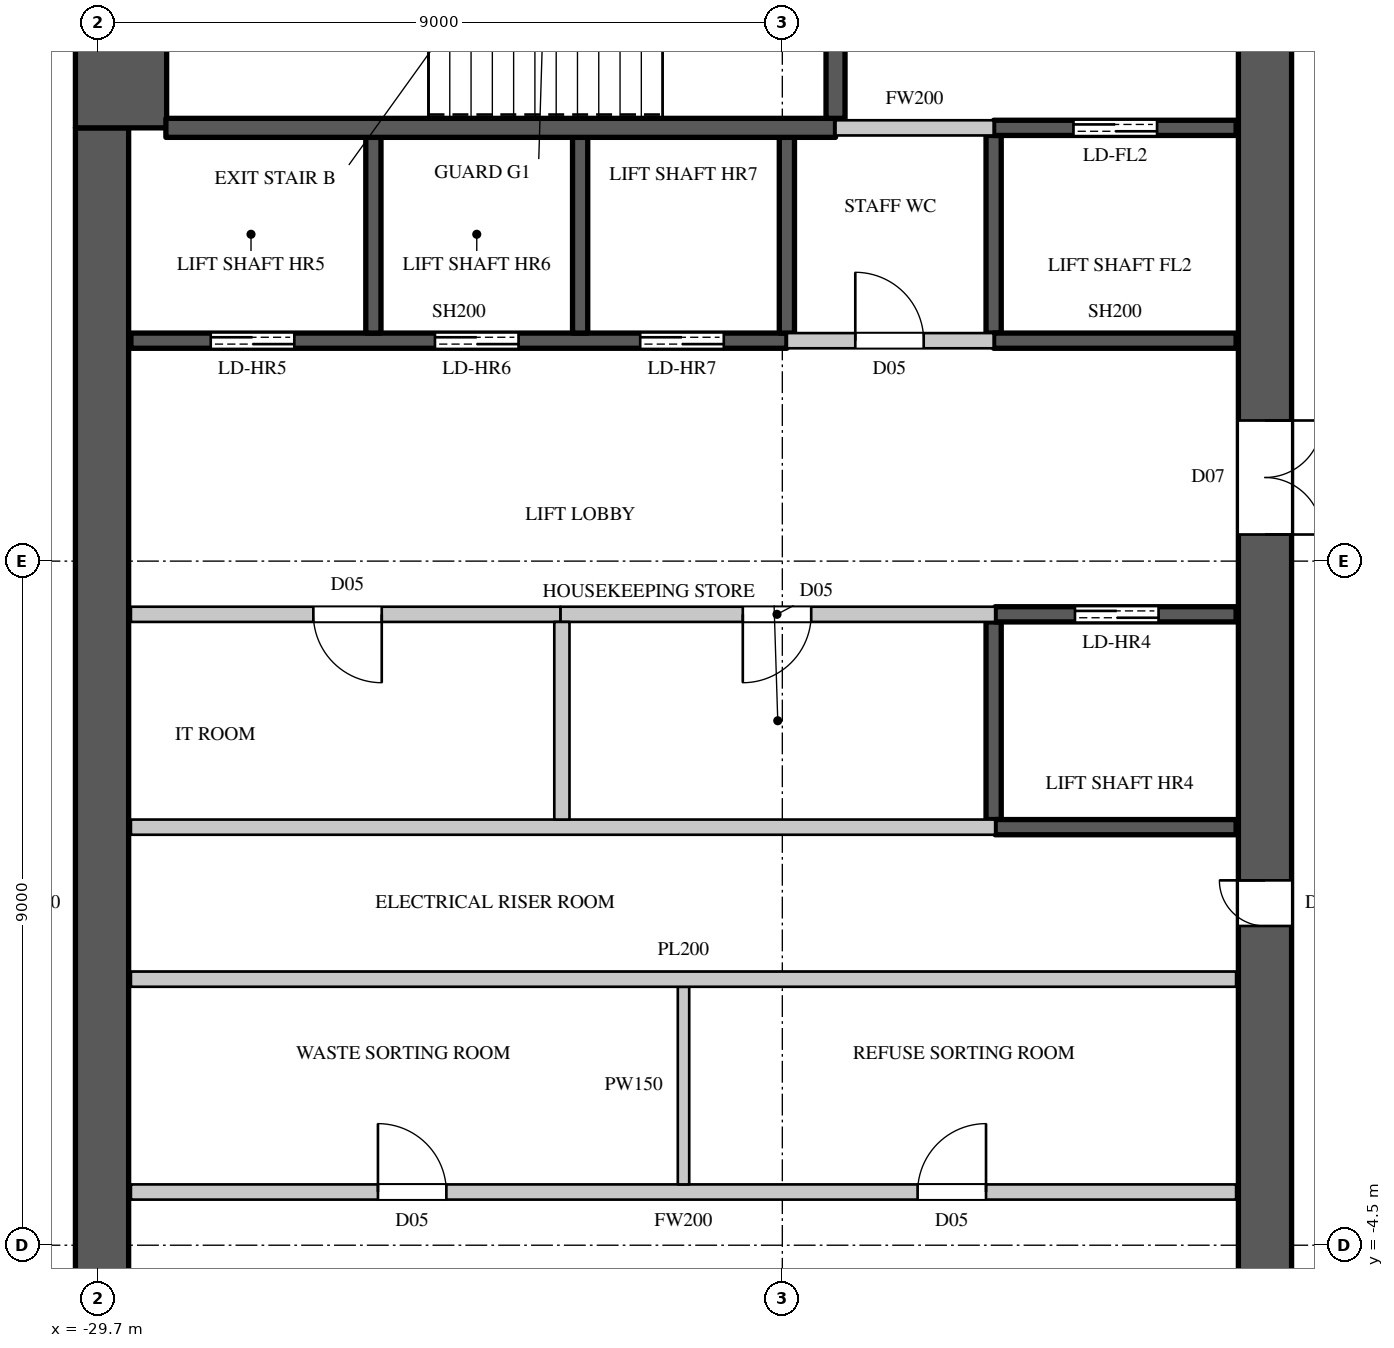
"""IFC4 building model, lengths in metres.
Left out: names, types, materials, properties, quantities, classifications, styles, units other than length and angle.
Written with IfcOpenShell. Run it as: python <this file> out.ifc"""

import sys

from ifc_helpers import new_model, si_unit, direction, frame, frame_2d, origin, place, context, subcontext, project, spatial, rectangle, extrude, element, fill, save


model = new_model("IFC4")
c1 = context("Model", 3, precision=1e-05, world=origin(), true_north=direction((0.0, 1.0)))
c2 = subcontext(c1, "Body", "Model", "MODEL_VIEW")
j1 = project(units=[si_unit("LENGTHUNIT", "METRE"), si_unit("PLANEANGLEUNIT", "RADIAN")], contexts=[c1])
p1 = place(None, origin())
s1 = spatial("IfcSite", under=j1, at=p1, CompositionType="ELEMENT")
p2 = place(p1, origin())
s2 = spatial("IfcBuilding", under=s1, at=p2, CompositionType="ELEMENT")
p3 = place(p2, frame((0.0, 0.0, 296.7)))
s3 = spatial("IfcBuildingStorey", under=s2, at=p3, CompositionType="ELEMENT", Elevation=296.7)
p4 = place(p3, frame((-14.35, -14.8, 0.0), z_axis=(0.0, 0.0, 1.0), x_axis=(0.0, 1.0, 0.0)))
e1 = element("IfcWall", 1, at=p4, inside=s3, PredefinedType="SHEAR", context=c2, shape_type="SweptSolid", body=[
    extrude(rectangle(XDim=29.6, YDim=0.7, at=frame_2d((14.8, 0.0))), origin(), (0.0, 0.0, 1.0), 4.1),
])
p5 = place(p4, frame((1.55, 0.0, 0.0)))
e2 = element("IfcOpeningElement", 2, at=p5, cuts=e1, PredefinedType="OPENING", context=c2, shape_type="SweptSolid", body=[
    extrude(rectangle(XDim=1.5, YDim=2.4, at=frame_2d((0.75, 1.2))), frame((0.0, 0.36, 0.0), z_axis=(0.0, -1.0, 0.0), x_axis=(1.0, 0.0, 0.0)), (0.0, 0.0, 1.0), 0.72),
])
p6 = place(p4, frame((26.55, 0.0, 0.0)))
e3 = element("IfcOpeningElement", 3, at=p6, cuts=e1, PredefinedType="OPENING", context=c2, shape_type="SweptSolid", body=[
    extrude(rectangle(XDim=1.5, YDim=2.4, at=frame_2d((0.75, 1.2))), frame((0.0, 0.36, 0.0), z_axis=(0.0, -1.0, 0.0), x_axis=(1.0, 0.0, 0.0)), (0.0, 0.0, 1.0), 0.72),
])
p7 = place(p4, frame((8.45, 0.0, 0.0)))
e4 = element("IfcOpeningElement", 4, at=p7, cuts=e1, PredefinedType="OPENING", context=c2, shape_type="SweptSolid", body=[
    extrude(rectangle(XDim=1.5, YDim=2.4, at=frame_2d((0.75, 1.2))), frame((0.0, 0.36, 0.0), z_axis=(0.0, -1.0, 0.0), x_axis=(1.0, 0.0, 0.0)), (0.0, 0.0, 1.0), 0.72),
])
p8 = place(p4, frame((19.65, 0.0, 0.0)))
e5 = element("IfcOpeningElement", 5, at=p8, cuts=e1, PredefinedType="OPENING", context=c2, shape_type="SweptSolid", body=[
    extrude(rectangle(XDim=1.5, YDim=2.4, at=frame_2d((0.75, 1.2))), frame((0.0, 0.36, 0.0), z_axis=(0.0, -1.0, 0.0), x_axis=(1.0, 0.0, 0.0)), (0.0, 0.0, 1.0), 0.72),
])
p9 = place(p4, frame((14.5, 0.0, 0.0)))
e6 = element("IfcOpeningElement", 6, at=p9, cuts=e1, PredefinedType="OPENING", context=c2, shape_type="SweptSolid", body=[
    extrude(rectangle(XDim=0.6, YDim=2.0, at=frame_2d((0.3, 1.0))), frame((0.0, 0.36, 0.0), z_axis=(0.0, -1.0, 0.0), x_axis=(1.0, 0.0, 0.0)), (0.0, 0.0, 1.0), 0.72),
])
p10 = place(p3, frame((-29.65, -10.2, 0.0), z_axis=(0.0, 0.0, 1.0), x_axis=(0.0, 1.0, 0.0)))
e7 = element("IfcWall", 7, at=p10, inside=s3, PredefinedType="SHEAR", context=c2, shape_type="SweptSolid", body=[
    extrude(rectangle(XDim=20.4, YDim=0.7, at=frame_2d((10.2, 0.0))), origin(), (0.0, 0.0, 1.0), 4.1),
])
p11 = place(p3, frame((-29.4, 10.2, 0.0), z_axis=(0.0, 0.0, 1.0), x_axis=(0.0, 1.0, 0.0)))
e8 = element("IfcWall", 8, at=p11, inside=s3, PredefinedType="SHEAR", context=c2, shape_type="SweptSolid", body=[
    extrude(rectangle(XDim=4.6, YDim=1.2, at=frame_2d((2.3, 0.0))), origin(), (0.0, 0.0, 1.0), 4.1),
])
p12 = place(p3, frame((-29.27, -3.8, 0.0), z_axis=(0.0, 0.0, 1.0), x_axis=(1.0, 0.0, 0.0)))
e9 = element("IfcWall", 9, at=p12, inside=s3, PredefinedType="PARTITIONING", context=c2, shape_type="SweptSolid", body=[
    extrude(rectangle(XDim=14.54, YDim=0.2, at=frame_2d((7.27, 0.0))), origin(), (0.0, 0.0, 1.0), 3.8),
])
p13 = place(p12, frame((3.25, 0.0, 0.0)))
e10 = element("IfcOpeningElement", 10, at=p13, cuts=e9, PredefinedType="OPENING", context=c2, shape_type="SweptSolid", body=[
    extrude(rectangle(XDim=0.9, YDim=2.2, at=frame_2d((0.45, 1.1))), frame((0.0, 0.11, 0.0), z_axis=(0.0, -1.0, 0.0), x_axis=(1.0, 0.0, 0.0)), (0.0, 0.0, 1.0), 0.22),
])
p14 = place(p12, frame((10.35, 0.0, 0.0)))
e11 = element("IfcOpeningElement", 11, at=p14, cuts=e9, PredefinedType="OPENING", context=c2, shape_type="SweptSolid", body=[
    extrude(rectangle(XDim=0.9, YDim=2.2, at=frame_2d((0.45, 1.1))), frame((0.0, 0.11, 0.0), z_axis=(0.0, -1.0, 0.0), x_axis=(1.0, 0.0, 0.0)), (0.0, 0.0, 1.0), 0.22),
])
p15 = place(p3, frame((-23.62, 3.8, 0.0), z_axis=(0.0, 0.0, 1.0), x_axis=(1.0, 0.0, 0.0)))
e12 = element("IfcWall", 12, at=p15, inside=s3, PredefinedType="PARTITIONING", context=c2, shape_type="SweptSolid", body=[
    extrude(rectangle(XDim=5.72, YDim=0.2, at=frame_2d((2.86, 0.0))), origin(), (0.0, 0.0, 1.0), 3.8),
])
p16 = place(p15, frame((2.4, 0.0, 0.0)))
e13 = element("IfcOpeningElement", 13, at=p16, cuts=e12, PredefinedType="OPENING", context=c2, shape_type="SweptSolid", body=[
    extrude(rectangle(XDim=0.9, YDim=2.2, at=frame_2d((0.45, 1.1))), frame((0.0, 0.11, 0.0), z_axis=(0.0, -1.0, 0.0), x_axis=(1.0, 0.0, 0.0)), (0.0, 0.0, 1.0), 0.22),
])
p17 = place(p3, frame((-20.64, 7.4, 0.0), z_axis=(0.0, 0.0, 1.0), x_axis=(1.0, 0.0, 0.0)))
e14 = element("IfcWall", 14, at=p17, inside=s3, PredefinedType="PARTITIONING", context=c2, shape_type="SweptSolid", body=[
    extrude(rectangle(XDim=2.72, YDim=0.2, at=frame_2d((1.36, 0.0))), origin(), (0.0, 0.0, 1.0), 3.8),
])
p18 = place(p17, frame((0.9, 0.0, 0.0)))
e15 = element("IfcOpeningElement", 15, at=p18, cuts=e14, PredefinedType="OPENING", context=c2, shape_type="SweptSolid", body=[
    extrude(rectangle(XDim=0.9, YDim=2.2, at=frame_2d((0.45, 1.1))), frame((0.0, 0.11, 0.0), z_axis=(0.0, -1.0, 0.0), x_axis=(1.0, 0.0, 0.0)), (0.0, 0.0, 1.0), 0.22),
])
p19 = place(p3, frame((-20.0, 10.2, 0.0), z_axis=(0.0, 0.0, 1.0), x_axis=(1.0, 0.0, 0.0)))
e16 = element("IfcWall", 16, at=p19, inside=s3, PredefinedType="PARTITIONING", context=c2, shape_type="SweptSolid", body=[
    extrude(rectangle(XDim=2.08, YDim=0.2, at=frame_2d((1.04, 0.0))), origin(), (0.0, 0.0, 1.0), 3.8),
])
p20 = place(p3, frame((-22.0, -3.7, 0.0), z_axis=(0.0, 0.0, 1.0), x_axis=(0.0, 1.0, 0.0)))
e17 = element("IfcWall", 17, at=p20, inside=s3, PredefinedType="PARTITIONING", context=c2, shape_type="SweptSolid", body=[
    extrude(rectangle(XDim=2.6, YDim=0.15, at=frame_2d((1.3, 0.0))), origin(), (0.0, 0.0, 1.0), 3.8),
])
p21 = place(p3, frame((-29.27, -1.0, 0.0), z_axis=(0.0, 0.0, 1.0), x_axis=(1.0, 0.0, 0.0)))
e18 = element("IfcWall", 18, at=p21, inside=s3, PredefinedType="PARTITIONING", context=c2, shape_type="SweptSolid", body=[
    extrude(rectangle(XDim=14.54, YDim=0.2, at=frame_2d((7.27, 0.0))), origin(), (0.0, 0.0, 1.0), 3.8),
])
p22 = place(p3, frame((-29.27, 1.0, 0.0), z_axis=(0.0, 0.0, 1.0), x_axis=(1.0, 0.0, 0.0)))
e19 = element("IfcWall", 19, at=p22, inside=s3, PredefinedType="PARTITIONING", context=c2, shape_type="SweptSolid", body=[
    extrude(rectangle(XDim=11.37, YDim=0.2, at=frame_2d((5.685, 0.0))), origin(), (0.0, 0.0, 1.0), 3.8),
])
p23 = place(p3, frame((-29.27, 3.8, 0.0), z_axis=(0.0, 0.0, 1.0), x_axis=(1.0, 0.0, 0.0)))
e20 = element("IfcWall", 20, at=p23, inside=s3, PredefinedType="PARTITIONING", context=c2, shape_type="SweptSolid", body=[
    extrude(rectangle(XDim=5.65, YDim=0.2, at=frame_2d((2.825, 0.0))), origin(), (0.0, 0.0, 1.0), 3.8),
])
p24 = place(p23, frame((2.4, 0.0, 0.0)))
e21 = element("IfcOpeningElement", 21, at=p24, cuts=e20, PredefinedType="OPENING", context=c2, shape_type="SweptSolid", body=[
    extrude(rectangle(XDim=0.9, YDim=2.2, at=frame_2d((0.45, 1.1))), frame((0.0, 0.11, 0.0), z_axis=(0.0, -1.0, 0.0), x_axis=(1.0, 0.0, 0.0)), (0.0, 0.0, 1.0), 0.22),
])
p25 = place(p3, frame((-23.6, 1.1, 0.0), z_axis=(0.0, 0.0, 1.0), x_axis=(0.0, 1.0, 0.0)))
e22 = element("IfcWall", 22, at=p25, inside=s3, PredefinedType="PARTITIONING", context=c2, shape_type="SweptSolid", body=[
    extrude(rectangle(XDim=2.6, YDim=0.2, at=frame_2d((1.3, 0.0))), origin(), (0.0, 0.0, 1.0), 3.8),
])
p26 = place(p3, frame((-29.27, 7.4, 0.0), z_axis=(0.0, 0.0, 1.0), x_axis=(1.0, 0.0, 0.0)))
e23 = element("IfcWall", 23, at=p26, inside=s3, PredefinedType="SHEAR", context=c2, shape_type="SweptSolid", body=[
    extrude(rectangle(XDim=8.63, YDim=0.2, at=frame_2d((4.315, 0.0))), origin(), (0.0, 0.0, 1.0), 3.8),
])
p27 = place(p26, frame((1.05, 0.0, 0.0)))
e24 = element("IfcOpeningElement", 24, at=p27, cuts=e23, PredefinedType="OPENING", context=c2, shape_type="SweptSolid", body=[
    extrude(rectangle(XDim=1.1, YDim=2.2, at=frame_2d((0.55, 1.1))), frame((0.0, 0.11, 0.0), z_axis=(0.0, -1.0, 0.0), x_axis=(1.0, 0.0, 0.0)), (0.0, 0.0, 1.0), 0.22),
])
p28 = place(p26, frame((4.0, 0.0, 0.0)))
e25 = element("IfcOpeningElement", 25, at=p28, cuts=e23, PredefinedType="OPENING", context=c2, shape_type="SweptSolid", body=[
    extrude(rectangle(XDim=1.1, YDim=2.2, at=frame_2d((0.55, 1.1))), frame((0.0, 0.11, 0.0), z_axis=(0.0, -1.0, 0.0), x_axis=(1.0, 0.0, 0.0)), (0.0, 0.0, 1.0), 0.22),
])
p29 = place(p26, frame((6.7, 0.0, 0.0)))
e26 = element("IfcOpeningElement", 26, at=p29, cuts=e23, PredefinedType="OPENING", context=c2, shape_type="SweptSolid", body=[
    extrude(rectangle(XDim=1.1, YDim=2.2, at=frame_2d((0.55, 1.1))), frame((0.0, 0.11, 0.0), z_axis=(0.0, -1.0, 0.0), x_axis=(1.0, 0.0, 0.0)), (0.0, 0.0, 1.0), 0.22),
])
for number, where, z_axis, x_axis in (
    (27, (-26.08, 7.5, 0.0), (0.0, 0.0, 1.0), (0.0, 1.0, 0.0)),
    (28, (-23.36, 7.5, 0.0), (0.0, 0.0, 1.0), (0.0, 1.0, 0.0)),
):
    element("IfcWall", number, at=place(p3, frame(where, z_axis=z_axis, x_axis=x_axis)), inside=s3, PredefinedType="SHEAR", context=c2, shape_type="SweptSolid", body=[
        extrude(rectangle(XDim=2.575, YDim=0.2, at=frame_2d((1.288, 0.0))), origin(), (0.0, 0.0, 1.0), 4.1),
    ])
p30 = place(p3, frame((-20.64, 7.5, 0.0), z_axis=(0.0, 0.0, 1.0), x_axis=(0.0, 1.0, 0.0)))
e29 = element("IfcWall", 29, at=p30, inside=s3, PredefinedType="SHEAR", context=c2, shape_type="SweptSolid", body=[
    extrude(rectangle(XDim=2.575, YDim=0.2, at=frame_2d((1.288, 0.0))), origin(), (0.0, 0.0, 1.0), 3.8),
])
p31 = place(p3, frame((-17.92, 1.1, 0.0), z_axis=(0.0, 0.0, 1.0), x_axis=(0.0, 1.0, 0.0)))
e30 = element("IfcWall", 30, at=p31, inside=s3, PredefinedType="SHEAR", context=c2, shape_type="SweptSolid", body=[
    extrude(rectangle(XDim=2.6, YDim=0.2, at=frame_2d((1.3, 0.0))), origin(), (0.0, 0.0, 1.0), 3.8),
])
p32 = place(p3, frame((-17.9, 1.0, 0.0), z_axis=(0.0, 0.0, 1.0), x_axis=(1.0, 0.0, 0.0)))
e31 = element("IfcWall", 31, at=p32, inside=s3, PredefinedType="SHEAR", context=c2, shape_type="SweptSolid", body=[
    extrude(rectangle(XDim=3.17, YDim=0.2, at=frame_2d((1.585, 0.0))), origin(), (0.0, 0.0, 1.0), 3.8),
])
p33 = place(p3, frame((-17.9, 3.8, 0.0), z_axis=(0.0, 0.0, 1.0), x_axis=(1.0, 0.0, 0.0)))
e32 = element("IfcWall", 32, at=p33, inside=s3, PredefinedType="SHEAR", context=c2, shape_type="SweptSolid", body=[
    extrude(rectangle(XDim=3.17, YDim=0.2, at=frame_2d((1.585, 0.0))), origin(), (0.0, 0.0, 1.0), 3.8),
])
p34 = place(p33, frame((1.05, 0.0, 0.0)))
e33 = element("IfcOpeningElement", 33, at=p34, cuts=e32, PredefinedType="OPENING", context=c2, shape_type="SweptSolid", body=[
    extrude(rectangle(XDim=1.1, YDim=2.2, at=frame_2d((0.55, 1.1))), frame((0.0, 0.11, 0.0), z_axis=(0.0, -1.0, 0.0), x_axis=(1.0, 0.0, 0.0)), (0.0, 0.0, 1.0), 0.22),
])
p35 = place(p3, frame((-17.92, 7.5, 0.0), z_axis=(0.0, 0.0, 1.0), x_axis=(0.0, 1.0, 0.0)))
e34 = element("IfcWall", 34, at=p35, inside=s3, PredefinedType="SHEAR", context=c2, shape_type="SweptSolid", body=[
    extrude(rectangle(XDim=2.6, YDim=0.2, at=frame_2d((1.3, 0.0))), origin(), (0.0, 0.0, 1.0), 3.8),
])
p36 = place(p3, frame((-17.92, 7.4, 0.0), z_axis=(0.0, 0.0, 1.0), x_axis=(1.0, 0.0, 0.0)))
e35 = element("IfcWall", 35, at=p36, inside=s3, PredefinedType="SHEAR", context=c2, shape_type="SweptSolid", body=[
    extrude(rectangle(XDim=3.19, YDim=0.2, at=frame_2d((1.595, 0.0))), origin(), (0.0, 0.0, 1.0), 3.8),
])
p37 = place(p3, frame((-17.92, 10.2, 0.0), z_axis=(0.0, 0.0, 1.0), x_axis=(1.0, 0.0, 0.0)))
e36 = element("IfcWall", 36, at=p37, inside=s3, PredefinedType="SHEAR", context=c2, shape_type="SweptSolid", body=[
    extrude(rectangle(XDim=3.19, YDim=0.2, at=frame_2d((1.595, 0.0))), origin(), (0.0, 0.0, 1.0), 3.8),
])
p38 = place(p37, frame((1.05, 0.0, 0.0)))
e37 = element("IfcOpeningElement", 37, at=p38, cuts=e36, PredefinedType="OPENING", context=c2, shape_type="SweptSolid", body=[
    extrude(rectangle(XDim=1.1, YDim=2.2, at=frame_2d((0.55, 1.1))), frame((0.0, 0.11, 0.0), z_axis=(0.0, -1.0, 0.0), x_axis=(1.0, 0.0, 0.0)), (0.0, 0.0, 1.0), 0.22),
])
p39 = place(p3, frame((-28.81, 10.2, 0.0), z_axis=(0.0, 0.0, 1.0), x_axis=(1.0, 0.0, 0.0)))
e38 = element("IfcWall", 38, at=p39, inside=s3, PredefinedType="SHEAR", context=c2, shape_type="SweptSolid", body=[
    extrude(rectangle(XDim=8.81, YDim=0.25, at=frame_2d((4.405, 0.0))), origin(), (0.0, 0.0, 1.0), 3.8),
])
p40 = place(p3, frame((-20.0, 10.325, 0.0), z_axis=(0.0, 0.0, 1.0), x_axis=(0.0, 1.0, 0.0)))
e39 = element("IfcWall", 39, at=p40, inside=s3, PredefinedType="SHEAR", context=c2, shape_type="SweptSolid", body=[
    extrude(rectangle(XDim=4.445, YDim=0.25, at=frame_2d((2.223, 0.0))), origin(), (0.0, 0.0, 1.0), 3.8),
])
p41 = place(p40, frame((1.65, 0.0, 0.0)))
e40 = element("IfcOpeningElement", 40, at=p41, cuts=e39, PredefinedType="OPENING", context=c2, shape_type="SweptSolid", body=[
    extrude(rectangle(XDim=1.1, YDim=2.2, at=frame_2d((0.55, 1.1))), frame((0.0, 0.135, 0.0), z_axis=(0.0, -1.0, 0.0), x_axis=(1.0, 0.0, 0.0)), (0.0, 0.0, 1.0), 0.27),
])
p42 = place(p13, origin())
e41 = element("IfcDoor", 41, at=p42, inside=s3, OperationType="SINGLE_SWING_LEFT", PredefinedType="DOOR", context=c2, shape_type="SweptSolid", body=[
    extrude(rectangle(XDim=0.9, YDim=2.2, at=frame_2d((0.45, 1.1))), frame((0.0, 0.025, 0.0), z_axis=(0.0, -1.0, 0.0), x_axis=(1.0, 0.0, 0.0)), (0.0, 0.0, 1.0), 0.05),
])
fill(e10, e41)
p43 = place(p14, origin())
e42 = element("IfcDoor", 42, at=p43, inside=s3, OperationType="SINGLE_SWING_RIGHT", PredefinedType="DOOR", context=c2, shape_type="SweptSolid", body=[
    extrude(rectangle(XDim=0.9, YDim=2.2, at=frame_2d((0.45, 1.1))), frame((0.0, 0.025, 0.0), z_axis=(0.0, -1.0, 0.0), x_axis=(1.0, 0.0, 0.0)), (0.0, 0.0, 1.0), 0.05),
])
fill(e11, e42)
p44 = place(p24, origin())
e43 = element("IfcDoor", 43, at=p44, inside=s3, OperationType="SINGLE_SWING_LEFT", PredefinedType="DOOR", context=c2, shape_type="SweptSolid", body=[
    extrude(rectangle(XDim=0.9, YDim=2.2, at=frame_2d((0.45, 1.1))), frame((0.0, 0.025, 0.0), z_axis=(0.0, -1.0, 0.0), x_axis=(1.0, 0.0, 0.0)), (0.0, 0.0, 1.0), 0.05),
])
fill(e21, e43)
p45 = place(p16, origin())
e44 = element("IfcDoor", 44, at=p45, inside=s3, OperationType="SINGLE_SWING_RIGHT", PredefinedType="DOOR", context=c2, shape_type="SweptSolid", body=[
    extrude(rectangle(XDim=0.9, YDim=2.2, at=frame_2d((0.45, 1.1))), frame((0.0, 0.025, 0.0), z_axis=(0.0, -1.0, 0.0), x_axis=(1.0, 0.0, 0.0)), (0.0, 0.0, 1.0), 0.05),
])
fill(e13, e44)
p46 = place(p18, origin())
e45 = element("IfcDoor", 45, at=p46, inside=s3, OperationType="SINGLE_SWING_LEFT", PredefinedType="DOOR", context=c2, shape_type="SweptSolid", body=[
    extrude(rectangle(XDim=0.9, YDim=2.2, at=frame_2d((0.45, 1.1))), frame((0.0, 0.025, 0.0), z_axis=(0.0, -1.0, 0.0), x_axis=(1.0, 0.0, 0.0)), (0.0, 0.0, 1.0), 0.05),
])
fill(e15, e45)
p47 = place(p34, origin())
e46 = element("IfcDoor", 46, at=p47, inside=s3, OperationType="DOUBLE_DOOR_SLIDING", PredefinedType="DOOR", context=c2, shape_type="SweptSolid", body=[
    extrude(rectangle(XDim=1.1, YDim=2.2, at=frame_2d((0.55, 1.1))), frame((0.0, 0.025, 0.0), z_axis=(0.0, -1.0, 0.0), x_axis=(1.0, 0.0, 0.0)), (0.0, 0.0, 1.0), 0.05),
])
fill(e33, e46)
p48 = place(p27, origin())
e47 = element("IfcDoor", 47, at=p48, inside=s3, OperationType="DOUBLE_DOOR_SLIDING", PredefinedType="DOOR", context=c2, shape_type="SweptSolid", body=[
    extrude(rectangle(XDim=1.1, YDim=2.2, at=frame_2d((0.55, 1.1))), frame((0.0, 0.025, 0.0), z_axis=(0.0, -1.0, 0.0), x_axis=(1.0, 0.0, 0.0)), (0.0, 0.0, 1.0), 0.05),
])
fill(e24, e47)
p49 = place(p28, origin())
e48 = element("IfcDoor", 48, at=p49, inside=s3, OperationType="DOUBLE_DOOR_SLIDING", PredefinedType="DOOR", context=c2, shape_type="SweptSolid", body=[
    extrude(rectangle(XDim=1.1, YDim=2.2, at=frame_2d((0.55, 1.1))), frame((0.0, 0.025, 0.0), z_axis=(0.0, -1.0, 0.0), x_axis=(1.0, 0.0, 0.0)), (0.0, 0.0, 1.0), 0.05),
])
fill(e25, e48)
p50 = place(p29, origin())
e49 = element("IfcDoor", 49, at=p50, inside=s3, OperationType="DOUBLE_DOOR_SLIDING", PredefinedType="DOOR", context=c2, shape_type="SweptSolid", body=[
    extrude(rectangle(XDim=1.1, YDim=2.2, at=frame_2d((0.55, 1.1))), frame((0.0, 0.025, 0.0), z_axis=(0.0, -1.0, 0.0), x_axis=(1.0, 0.0, 0.0)), (0.0, 0.0, 1.0), 0.05),
])
fill(e26, e49)
p51 = place(p38, origin())
e50 = element("IfcDoor", 50, at=p51, inside=s3, OperationType="DOUBLE_DOOR_SLIDING", PredefinedType="DOOR", context=c2, shape_type="SweptSolid", body=[
    extrude(rectangle(XDim=1.1, YDim=2.2, at=frame_2d((0.55, 1.1))), frame((0.0, 0.025, 0.0), z_axis=(0.0, -1.0, 0.0), x_axis=(1.0, 0.0, 0.0)), (0.0, 0.0, 1.0), 0.05),
])
fill(e37, e50)
p52 = place(p8, origin())
e51 = element("IfcDoor", 51, at=p52, inside=s3, OperationType="DOUBLE_DOOR_SINGLE_SWING", PredefinedType="DOOR", context=c2, shape_type="SweptSolid", body=[
    extrude(rectangle(XDim=1.5, YDim=2.4, at=frame_2d((0.75, 1.2))), frame((0.0, -0.295, 0.0), z_axis=(0.0, -1.0, 0.0), x_axis=(1.0, 0.0, 0.0)), (0.0, 0.0, 1.0), 0.05),
])
fill(e5, e51)
p53 = place(p9, origin())
e52 = element("IfcDoor", 52, at=p53, inside=s3, OperationType="SINGLE_SWING_RIGHT", PredefinedType="DOOR", context=c2, shape_type="SweptSolid", body=[
    extrude(rectangle(XDim=0.6, YDim=2.0, at=frame_2d((0.3, 1.0))), frame((0.0, 0.345, 0.0), z_axis=(0.0, -1.0, 0.0), x_axis=(1.0, 0.0, 0.0)), (0.0, 0.0, 1.0), 0.05),
])
fill(e6, e52)
save(model, sys.argv[1])
